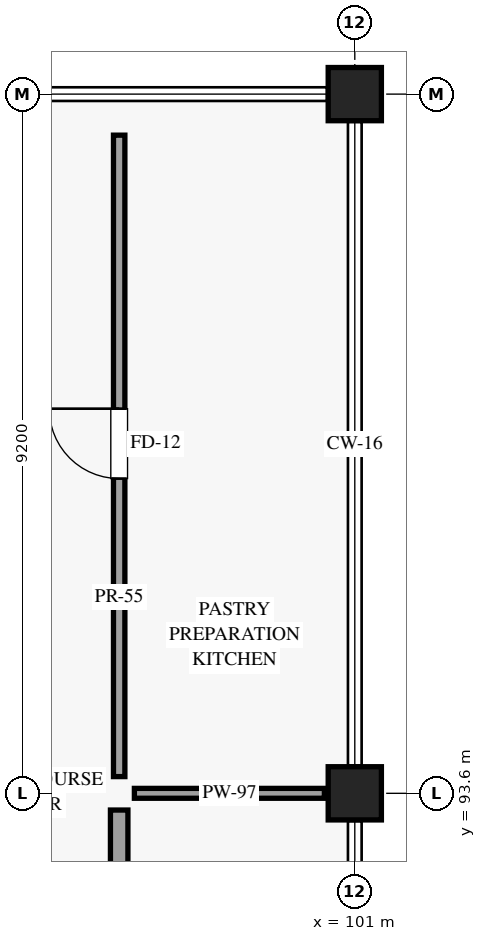
"""IFC4 building model, lengths in metres.
Left out: names, types, materials, properties, quantities, classifications, styles, units other than length and angle.
Written with IfcOpenShell. Run it as: python <this file> out.ifc"""

import sys

from ifc_helpers import new_model, si_unit, direction, frame, frame_2d, origin, origin_2d, place, context, subcontext, project, spatial, rectangle, extrude, element, fill, save


model = new_model("IFC4")
c1 = context("Model", 3, precision=1e-05, world=origin(), true_north=direction((0.0, 1.0)))
c2 = subcontext(c1, "Body", "Model", "MODEL_VIEW")
j1 = project(units=[si_unit("LENGTHUNIT", "METRE"), si_unit("PLANEANGLEUNIT", "RADIAN")], contexts=[c1])
p1 = place(None, origin())
s1 = spatial("IfcSite", under=j1, at=p1, CompositionType="ELEMENT")
p2 = place(p1, origin())
s2 = spatial("IfcBuilding", under=s1, at=p2, CompositionType="ELEMENT")
p3 = place(p2, frame((0.0, 0.0, 5.4)))
s3 = spatial("IfcBuildingStorey", under=s2, at=p3, CompositionType="ELEMENT", Elevation=5.4)
for number, where, z_axis, x_axis in (
    (1, (101.0, 93.6, 0.0), (0.0, 0.0, 1.0), (1.0, 0.0, 0.0)),
    (2, (101.0, 102.8, 0.0), (0.0, 0.0, 1.0), (1.0, 0.0, 0.0)),
):
    element("IfcColumn", number, at=place(p3, frame(where, z_axis=z_axis, x_axis=x_axis)), inside=s3, PredefinedType="COLUMN", context=c2, shape_type="SweptSolid", body=[
        extrude(rectangle(XDim=0.7, YDim=0.7, at=origin_2d()), origin(), (0.0, 0.0, 1.0), 4.8),
    ])
p4 = place(p3, frame((97.9, 75.42, 0.0), z_axis=(0.0, 0.0, 1.0), x_axis=(0.0, 1.0, 0.0)))
e3 = element("IfcWall", 3, at=p4, inside=s3, PredefinedType="PARTITIONING", context=c2, shape_type="SweptSolid", body=[
    extrude(rectangle(XDim=17.96, YDim=0.23, at=frame_2d((8.98, 0.0))), origin(), (0.0, 0.0, 1.0), 3.675),
])
p5 = place(p4, frame((3.936, 0.0, 0.0)))
e4 = element("IfcOpeningElement", 4, at=p5, cuts=e3, PredefinedType="OPENING", context=c2, shape_type="SweptSolid", body=[
    extrude(rectangle(XDim=1.2, YDim=2.3, at=frame_2d((0.6, 1.15))), frame((0.0, 0.125, 0.0), z_axis=(0.0, -1.0, 0.0), x_axis=(1.0, 0.0, 0.0)), (0.0, 0.0, 1.0), 0.25),
])
p6 = place(p3, frame((98.1, 93.6, 0.0), z_axis=(0.0, 0.0, 1.0), x_axis=(1.0, 0.0, 0.0)))
e5 = element("IfcWall", 5, at=p6, inside=s3, PredefinedType="PARTITIONING", context=c2, shape_type="SweptSolid", body=[
    extrude(rectangle(XDim=2.5, YDim=0.13, at=frame_2d((1.25, 0.0))), origin(), (0.0, 0.0, 1.0), 3.675),
])
p7 = place(p3, frame((97.9, 93.82, 0.0), z_axis=(0.0, 0.0, 1.0), x_axis=(0.0, 1.0, 0.0)))
e6 = element("IfcWall", 6, at=p7, inside=s3, PredefinedType="PARTITIONING", context=c2, shape_type="SweptSolid", body=[
    extrude(rectangle(XDim=8.44, YDim=0.15, at=frame_2d((4.22, 0.0))), origin(), (0.0, 0.0, 1.0), 3.675),
])
p8 = place(p7, frame((3.921, 0.0, 0.0)))
e7 = element("IfcOpeningElement", 7, at=p8, cuts=e6, PredefinedType="OPENING", context=c2, shape_type="SweptSolid", body=[
    extrude(rectangle(XDim=0.92, YDim=2.12, at=frame_2d((0.46, 1.06))), frame((0.0, 0.085, 0.0), z_axis=(0.0, -1.0, 0.0), x_axis=(1.0, 0.0, 0.0)), (0.0, 0.0, 1.0), 0.17),
])
p9 = place(p8, origin())
e8 = element("IfcDoor", 8, at=p9, inside=s3, OperationType="SINGLE_SWING_RIGHT", PredefinedType="DOOR", context=c2, shape_type="SweptSolid", body=[
    extrude(rectangle(XDim=0.92, YDim=2.12, at=frame_2d((0.46, 1.06))), frame((0.0, 0.025, 0.0), z_axis=(0.0, -1.0, 0.0), x_axis=(1.0, 0.0, 0.0)), (0.0, 0.0, 1.0), 0.05),
])
fill(e7, e8)
save(model, sys.argv[1])
